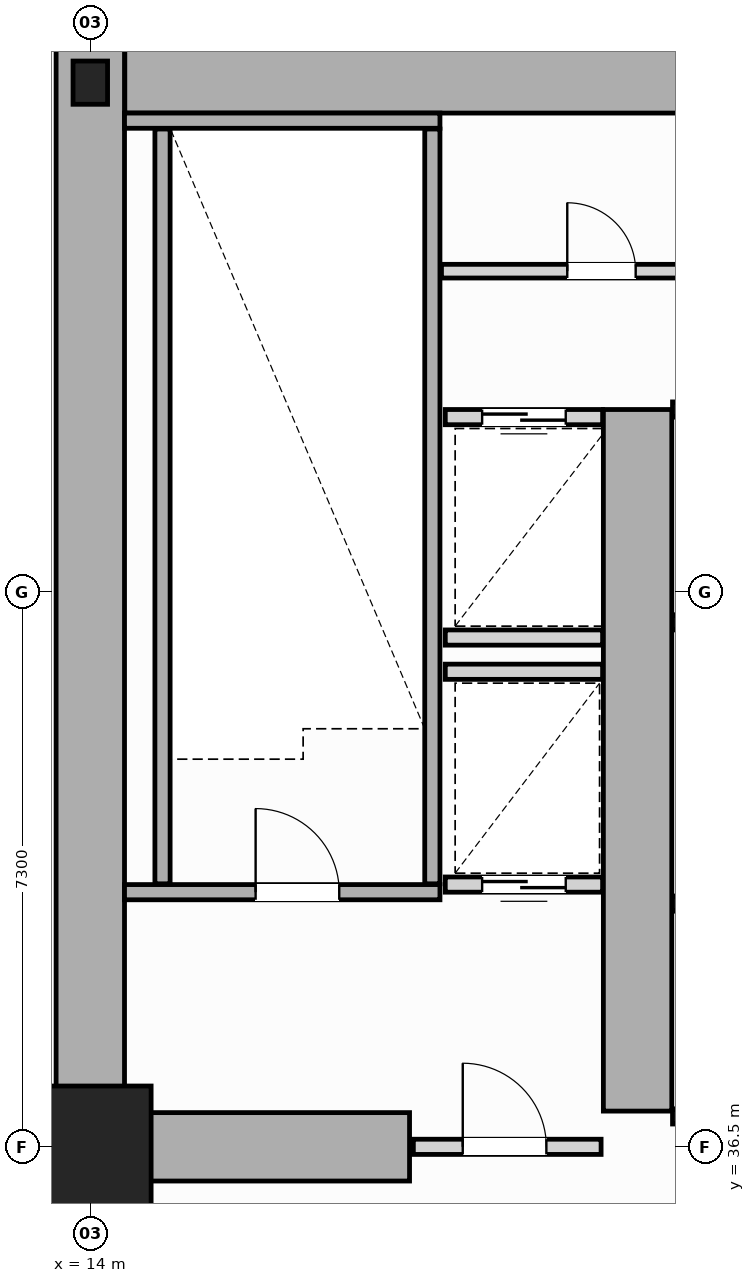
"""IFC4 building model, lengths in metres.
Left out: names, types, materials, properties, quantities, classifications, styles, units other than length and angle.
Written with IfcOpenShell. Run it as: python <this file> out.ifc"""

import sys

from ifc_helpers import new_model, si_unit, direction, frame, frame_2d, origin, origin_2d, place, context, subcontext, project, spatial, rectangle, i_section, extrude, source, transform, mapped, element, fill, save


model = new_model("IFC4")
c1 = context("Model", 3, precision=1e-05, world=origin(), true_north=direction((0.0, 1.0)))
c2 = subcontext(c1, "Body", "Model", "MODEL_VIEW")
j1 = project(units=[si_unit("LENGTHUNIT", "METRE"), si_unit("PLANEANGLEUNIT", "RADIAN")], contexts=[c1])
p1 = place(None, origin())
s1 = spatial("IfcSite", under=j1, at=p1, CompositionType="ELEMENT")
p2 = place(p1, origin())
s2 = spatial("IfcBuilding", under=s1, at=p2, CompositionType="ELEMENT")
p3 = place(p2, origin())
s3 = spatial("IfcBuildingStorey", under=s2, at=p3, CompositionType="ELEMENT", Elevation=0.0)
m1 = source(origin(), c2, "Body", "SweptSolid", [
    extrude(rectangle(XDim=1.6, YDim=1.6, at=origin_2d()), origin(), (0.0, 0.0, 1.0), 5.6),
])
p4 = place(p3, frame((14.0, 36.5, 0.0), z_axis=(0.0, 0.0, 1.0), x_axis=(1.0, 0.0, 0.0)))
e1 = element("IfcColumn", 1, at=p4, inside=s3, PredefinedType="COLUMN", context=c2, shape_type="MappedRepresentation", body=[
    mapped(m1, transform((0.0, 0.0, 0.0), scale=1.0)),
])
m2 = source(origin(), c2, "Body", "SweptSolid", [
    extrude(i_section(OverallWidth=0.454, OverallDepth=0.569, WebThickness=0.078, FlangeThickness=0.08, FilletRadius=0.015, at=origin_2d()), origin(), (0.0, 0.0, 1.0), 5.6),
])
p5 = place(p3, frame((14.0, 50.5, 0.0), z_axis=(0.0, 0.0, 1.0), x_axis=(1.0, 0.0, 0.0)))
e2 = element("IfcColumn", 2, at=p5, inside=s3, PredefinedType="COLUMN", context=c2, shape_type="MappedRepresentation", body=[
    mapped(m2, transform((0.0, 0.0, 0.0), scale=1.0)),
])
p6 = place(p3, frame((14.454, 50.55, 0.0), z_axis=(0.0, 0.0, 1.0), x_axis=(1.0, 0.0, 0.0)))
e3 = element("IfcWall", 3, at=p6, inside=s3, PredefinedType="SHEAR", context=c2, shape_type="SweptSolid", body=[
    extrude(rectangle(XDim=19.544, YDim=0.9, at=frame_2d((9.772, 0.0))), origin(), (0.0, 0.0, 1.0), 5.6),
])
p7 = place(p3, frame((14.0, 36.5, 0.0), z_axis=(0.0, 0.0, 1.0), x_axis=(0.0, 1.0, 0.0)))
e4 = element("IfcWall", 4, at=p7, inside=s3, PredefinedType="SHEAR", context=c2, shape_type="SweptSolid", body=[
    extrude(rectangle(XDim=14.5, YDim=0.9, at=frame_2d((7.25, 0.0))), origin(), (0.0, 0.0, 1.0), 5.6),
])
p8 = place(p3, frame((14.47, 36.5, 0.0), z_axis=(0.0, 0.0, 1.0), x_axis=(1.0, 0.0, 0.0)))
e5 = element("IfcWall", 5, at=p8, inside=s3, PredefinedType="SHEAR", context=c2, shape_type="SweptSolid", body=[
    extrude(rectangle(XDim=3.73, YDim=0.9, at=frame_2d((1.865, 0.0))), origin(), (0.0, 0.0, 1.0), 4.12),
])
p9 = place(p3, frame((21.2, 36.97, 0.0), z_axis=(0.0, 0.0, 1.0), x_axis=(0.0, 1.0, 0.0)))
e6 = element("IfcWall", 6, at=p9, inside=s3, PredefinedType="SHEAR", context=c2, shape_type="SweptSolid", body=[
    extrude(rectangle(XDim=9.23, YDim=0.9, at=frame_2d((4.615, 0.0))), origin(), (0.0, 0.0, 1.0), 5.6),
])
p10 = place(p3, frame((14.45, 39.85, 0.0), z_axis=(0.0, 0.0, 1.0), x_axis=(1.0, 0.0, 0.0)))
e7 = element("IfcWall", 7, at=p10, inside=s3, PredefinedType="SOLIDWALL", context=c2, shape_type="SweptSolid", body=[
    extrude(rectangle(XDim=4.15, YDim=0.2, at=frame_2d((2.075, 0.0))), origin(), (0.0, 0.0, 1.0), 5.6),
])
p11 = place(p10, frame((1.725, 0.0, 0.0)))
e8 = element("IfcOpeningElement", 8, at=p11, cuts=e7, PredefinedType="OPENING", context=c2, shape_type="SweptSolid", body=[
    extrude(rectangle(XDim=1.1, YDim=2.15, at=frame_2d((0.55, 1.075))), frame((0.0, 0.11, 0.0), z_axis=(0.0, -1.0, 0.0), x_axis=(1.0, 0.0, 0.0)), (0.0, 0.0, 1.0), 0.22),
])
p12 = place(p3, frame((14.45, 50.0, 0.0), z_axis=(0.0, 0.0, 1.0), x_axis=(1.0, 0.0, 0.0)))
e9 = element("IfcWall", 9, at=p12, inside=s3, PredefinedType="SOLIDWALL", context=c2, shape_type="SweptSolid", body=[
    extrude(rectangle(XDim=4.15, YDim=0.2, at=frame_2d((2.075, 0.0))), origin(), (0.0, 0.0, 1.0), 5.6),
])
for number, where, z_axis, x_axis in (
    (10, (14.95, 39.96, 0.0), (0.0, 0.0, 1.0), (0.0, 1.0, 0.0)),
    (11, (18.5, 39.96, 0.0), (0.0, 0.0, 1.0), (0.0, 1.0, 0.0)),
):
    element("IfcWall", number, at=place(p3, frame(where, z_axis=z_axis, x_axis=x_axis)), inside=s3, PredefinedType="SOLIDWALL", context=c2, shape_type="SweptSolid", body=[
        extrude(rectangle(XDim=9.93, YDim=0.2, at=frame_2d((4.965, 0.0))), origin(), (0.0, 0.0, 1.0), 5.6),
    ])
p13 = place(p3, frame((18.25, 36.5, 0.0), z_axis=(0.0, 0.0, 1.0), x_axis=(1.0, 0.0, 0.0)))
e12 = element("IfcWall", 12, at=p13, inside=s3, PredefinedType="SOLIDWALL", context=c2, shape_type="SweptSolid", body=[
    extrude(rectangle(XDim=2.47, YDim=0.2, at=frame_2d((1.235, 0.0))), origin(), (0.0, 0.0, 1.0), 4.11),
])
p14 = place(p13, frame((0.65, 0.0, 0.0)))
e13 = element("IfcOpeningElement", 13, at=p14, cuts=e12, PredefinedType="OPENING", context=c2, shape_type="SweptSolid", body=[
    extrude(rectangle(XDim=1.1, YDim=2.15, at=frame_2d((0.55, 1.075))), frame((0.0, 0.11, 0.0), z_axis=(0.0, -1.0, 0.0), x_axis=(1.0, 0.0, 0.0)), (0.0, 0.0, 1.0), 0.22),
])
p15 = place(p3, frame((21.66, 39.7, 0.0), z_axis=(0.0, 0.0, 1.0), x_axis=(1.0, 0.0, 0.0)))
e14 = element("IfcWall", 14, at=p15, inside=s3, PredefinedType="SOLIDWALL", context=c2, shape_type="SweptSolid", body=[
    extrude(rectangle(XDim=1.77, YDim=0.2, at=frame_2d((0.885, 0.0))), origin(), (0.0, 0.0, 1.0), 5.32),
])
p16 = place(p15, frame((0.335, 0.0, 0.0)))
e15 = element("IfcOpeningElement", 15, at=p16, cuts=e14, PredefinedType="OPENING", context=c2, shape_type="SweptSolid", body=[
    extrude(rectangle(XDim=1.1, YDim=2.15, at=frame_2d((0.55, 1.075))), frame((0.0, 0.11, 0.0), z_axis=(0.0, -1.0, 0.0), x_axis=(1.0, 0.0, 0.0)), (0.0, 0.0, 1.0), 0.22),
])
p17 = place(p3, frame((21.66, 36.9, 0.0), z_axis=(0.0, 0.0, 1.0), x_axis=(1.0, 0.0, 0.0)))
e16 = element("IfcWall", 16, at=p17, inside=s3, PredefinedType="SOLIDWALL", context=c2, shape_type="SweptSolid", body=[
    extrude(rectangle(XDim=1.77, YDim=0.2, at=frame_2d((0.885, 0.0))), origin(), (0.0, 0.0, 1.0), 4.11),
])
p18 = place(p3, frame((21.66, 43.4, 0.0), z_axis=(0.0, 0.0, 1.0), x_axis=(1.0, 0.0, 0.0)))
e17 = element("IfcWall", 17, at=p18, inside=s3, PredefinedType="SOLIDWALL", context=c2, shape_type="SweptSolid", body=[
    extrude(rectangle(XDim=1.65, YDim=0.2, at=frame_2d((0.825, 0.0))), origin(), (0.0, 0.0, 1.0), 5.32),
])
p19 = place(p18, frame((0.275, 0.0, 0.0)))
e18 = element("IfcOpeningElement", 18, at=p19, cuts=e17, PredefinedType="OPENING", context=c2, shape_type="SweptSolid", body=[
    extrude(rectangle(XDim=1.1, YDim=2.15, at=frame_2d((0.55, 1.075))), frame((0.0, 0.11, 0.0), z_axis=(0.0, -1.0, 0.0), x_axis=(1.0, 0.0, 0.0)), (0.0, 0.0, 1.0), 0.22),
])
p20 = place(p3, frame((21.66, 46.2, 0.0), z_axis=(0.0, 0.0, 1.0), x_axis=(1.0, 0.0, 0.0)))
e19 = element("IfcWall", 19, at=p20, inside=s3, PredefinedType="SOLIDWALL", context=c2, shape_type="SweptSolid", body=[
    extrude(rectangle(XDim=1.65, YDim=0.2, at=frame_2d((0.825, 0.0))), origin(), (0.0, 0.0, 1.0), 5.32),
])
p21 = place(p3, frame((18.67, 46.1, 0.0), z_axis=(0.0, 0.0, 1.0), x_axis=(1.0, 0.0, 0.0)))
e20 = element("IfcWall", 20, at=p21, inside=s3, PredefinedType="SOLIDWALL", context=c2, shape_type="SweptSolid", body=[
    extrude(rectangle(XDim=2.07, YDim=0.2, at=frame_2d((1.035, 0.0))), origin(), (0.0, 0.0, 1.0), 5.32),
])
p22 = place(p21, frame((0.485, 0.0, 0.0)))
e21 = element("IfcOpeningElement", 21, at=p22, cuts=e20, PredefinedType="OPENING", context=c2, shape_type="SweptSolid", body=[
    extrude(rectangle(XDim=1.1, YDim=2.15, at=frame_2d((0.55, 1.075))), frame((0.0, 0.11, 0.0), z_axis=(0.0, -1.0, 0.0), x_axis=(1.0, 0.0, 0.0)), (0.0, 0.0, 1.0), 0.22),
])
p23 = place(p3, frame((18.67, 43.2, 0.0), z_axis=(0.0, 0.0, 1.0), x_axis=(1.0, 0.0, 0.0)))
e22 = element("IfcWall", 22, at=p23, inside=s3, PredefinedType="SOLIDWALL", context=c2, shape_type="SweptSolid", body=[
    extrude(rectangle(XDim=2.07, YDim=0.2, at=frame_2d((1.035, 0.0))), origin(), (0.0, 0.0, 1.0), 5.32),
])
p24 = place(p3, frame((18.67, 39.95, 0.0), z_axis=(0.0, 0.0, 1.0), x_axis=(1.0, 0.0, 0.0)))
e23 = element("IfcWall", 23, at=p24, inside=s3, PredefinedType="SOLIDWALL", context=c2, shape_type="SweptSolid", body=[
    extrude(rectangle(XDim=2.07, YDim=0.2, at=frame_2d((1.035, 0.0))), origin(), (0.0, 0.0, 1.0), 5.32),
])
p25 = place(p24, frame((0.485, 0.0, 0.0)))
e24 = element("IfcOpeningElement", 24, at=p25, cuts=e23, PredefinedType="OPENING", context=c2, shape_type="SweptSolid", body=[
    extrude(rectangle(XDim=1.1, YDim=2.15, at=frame_2d((0.55, 1.075))), frame((0.0, 0.11, 0.0), z_axis=(0.0, -1.0, 0.0), x_axis=(1.0, 0.0, 0.0)), (0.0, 0.0, 1.0), 0.22),
])
p26 = place(p3, frame((18.67, 42.75, 0.0), z_axis=(0.0, 0.0, 1.0), x_axis=(1.0, 0.0, 0.0)))
e25 = element("IfcWall", 25, at=p26, inside=s3, PredefinedType="SOLIDWALL", context=c2, shape_type="SweptSolid", body=[
    extrude(rectangle(XDim=2.07, YDim=0.2, at=frame_2d((1.035, 0.0))), origin(), (0.0, 0.0, 1.0), 5.32),
])
p27 = place(p3, frame((18.62, 48.02, 0.0), z_axis=(0.0, 0.0, 1.0), x_axis=(1.0, 0.0, 0.0)))
e26 = element("IfcWall", 26, at=p27, inside=s3, PredefinedType="PLUMBINGWALL", context=c2, shape_type="SweptSolid", body=[
    extrude(rectangle(XDim=30.76, YDim=0.18, at=frame_2d((15.38, 0.0))), origin(), (0.0, 0.0, 1.0), 5.32),
])
p28 = place(p27, frame((1.655, 0.0, 0.0)))
e27 = element("IfcOpeningElement", 27, at=p28, cuts=e26, PredefinedType="OPENING", context=c2, shape_type="SweptSolid", body=[
    extrude(rectangle(XDim=0.9, YDim=2.15, at=frame_2d((0.45, 1.075))), frame((0.0, 0.1, 0.0), z_axis=(0.0, -1.0, 0.0), x_axis=(1.0, 0.0, 0.0)), (0.0, 0.0, 1.0), 0.2),
])
p29 = place(p27, frame((6.03, 0.0, 0.0)))
e28 = element("IfcOpeningElement", 28, at=p29, cuts=e26, PredefinedType="OPENING", context=c2, shape_type="SweptSolid", body=[
    extrude(rectangle(XDim=0.9, YDim=2.15, at=frame_2d((0.45, 1.075))), frame((0.0, 0.1, 0.0), z_axis=(0.0, -1.0, 0.0), x_axis=(1.0, 0.0, 0.0)), (0.0, 0.0, 1.0), 0.2),
])
p30 = place(p27, frame((10.93, 0.0, 0.0)))
e29 = element("IfcOpeningElement", 29, at=p30, cuts=e26, PredefinedType="OPENING", context=c2, shape_type="SweptSolid", body=[
    extrude(rectangle(XDim=0.9, YDim=2.15, at=frame_2d((0.45, 1.075))), frame((0.0, 0.1, 0.0), z_axis=(0.0, -1.0, 0.0), x_axis=(1.0, 0.0, 0.0)), (0.0, 0.0, 1.0), 0.2),
])
p31 = place(p27, frame((16.13, 0.0, 0.0)))
e30 = element("IfcOpeningElement", 30, at=p31, cuts=e26, PredefinedType="OPENING", context=c2, shape_type="SweptSolid", body=[
    extrude(rectangle(XDim=0.9, YDim=2.15, at=frame_2d((0.45, 1.075))), frame((0.0, 0.1, 0.0), z_axis=(0.0, -1.0, 0.0), x_axis=(1.0, 0.0, 0.0)), (0.0, 0.0, 1.0), 0.2),
])
p32 = place(p27, frame((21.73, 0.0, 0.0)))
e31 = element("IfcOpeningElement", 31, at=p32, cuts=e26, PredefinedType="OPENING", context=c2, shape_type="SweptSolid", body=[
    extrude(rectangle(XDim=0.9, YDim=2.15, at=frame_2d((0.45, 1.075))), frame((0.0, 0.1, 0.0), z_axis=(0.0, -1.0, 0.0), x_axis=(1.0, 0.0, 0.0)), (0.0, 0.0, 1.0), 0.2),
])
p33 = place(p27, frame((27.505, 0.0, 0.0)))
e32 = element("IfcOpeningElement", 32, at=p33, cuts=e26, PredefinedType="OPENING", context=c2, shape_type="SweptSolid", body=[
    extrude(rectangle(XDim=0.9, YDim=2.15, at=frame_2d((0.45, 1.075))), frame((0.0, 0.1, 0.0), z_axis=(0.0, -1.0, 0.0), x_axis=(1.0, 0.0, 0.0)), (0.0, 0.0, 1.0), 0.2),
])
p34 = place(p3, frame((5.35, 36.55, 0.0), z_axis=(0.0, 0.0, 1.0), x_axis=(1.0, 0.0, 0.0)))
e33 = element("IfcWall", 33, at=p34, inside=s3, PredefinedType="SOLIDWALL", context=c2, shape_type="SweptSolid", body=[
    extrude(rectangle(XDim=8.55, YDim=0.2, at=frame_2d((4.275, 0.0))), origin(), (0.0, 0.0, 1.0), 4.4),
])
p35 = place(p34, frame((3.8, 0.0, 0.0)))
e34 = element("IfcOpeningElement", 34, at=p35, cuts=e33, PredefinedType="OPENING", context=c2, shape_type="SweptSolid", body=[
    extrude(rectangle(XDim=1.1, YDim=2.15, at=frame_2d((0.55, 1.075))), frame((0.0, 0.11, 0.0), z_axis=(0.0, -1.0, 0.0), x_axis=(1.0, 0.0, 0.0)), (0.0, 0.0, 1.0), 0.22),
])
m3 = source(origin(), c2, "Body", "SweptSolid", [
    extrude(rectangle(XDim=1.1, YDim=2.15, at=frame_2d((0.55, 1.075))), frame((0.0, 0.025, 0.0), z_axis=(0.0, -1.0, 0.0), x_axis=(1.0, 0.0, 0.0)), (0.0, 0.0, 1.0), 0.05),
])
p36 = place(p11, origin())
e35 = element("IfcDoor", 35, at=p36, inside=s3, OperationType="SINGLE_SWING_LEFT", PredefinedType="DOOR", context=c2, shape_type="MappedRepresentation", body=[
    mapped(m3, transform((0.0, 0.0, 0.0), scale=1.0)),
])
fill(e8, e35)
p37 = place(p14, origin())
e36 = element("IfcDoor", 36, at=p37, inside=s3, OperationType="SINGLE_SWING_RIGHT", PredefinedType="DOOR", context=c2, shape_type="MappedRepresentation", body=[
    mapped(m3, transform((0.0, 0.0, 0.0), scale=1.0)),
])
fill(e13, e36)
p38 = place(p22, origin())
e37 = element("IfcDoor", 37, at=p38, inside=s3, OperationType="DOUBLE_DOOR_SLIDING", PredefinedType="DOOR", context=c2, shape_type="MappedRepresentation", body=[
    mapped(m3, transform((0.0, 0.0, 0.0), scale=1.0)),
])
fill(e21, e37)
p39 = place(p25, origin())
e38 = element("IfcDoor", 38, at=p39, inside=s3, OperationType="DOUBLE_DOOR_SLIDING", PredefinedType="DOOR", context=c2, shape_type="MappedRepresentation", body=[
    mapped(m3, transform((0.0, 0.0, 0.0), scale=1.0)),
])
fill(e24, e38)
m4 = source(origin(), c2, "Body", "SweptSolid", [
    extrude(rectangle(XDim=0.9, YDim=2.15, at=frame_2d((0.45, 1.075))), frame((0.0, 0.025, 0.0), z_axis=(0.0, -1.0, 0.0), x_axis=(1.0, 0.0, 0.0)), (0.0, 0.0, 1.0), 0.05),
])
p40 = place(p28, origin())
e39 = element("IfcDoor", 39, at=p40, inside=s3, OperationType="SINGLE_SWING_LEFT", PredefinedType="DOOR", context=c2, shape_type="MappedRepresentation", body=[
    mapped(m4, transform((0.0, 0.0, 0.0), scale=1.0)),
])
fill(e27, e39)
save(model, sys.argv[1])
